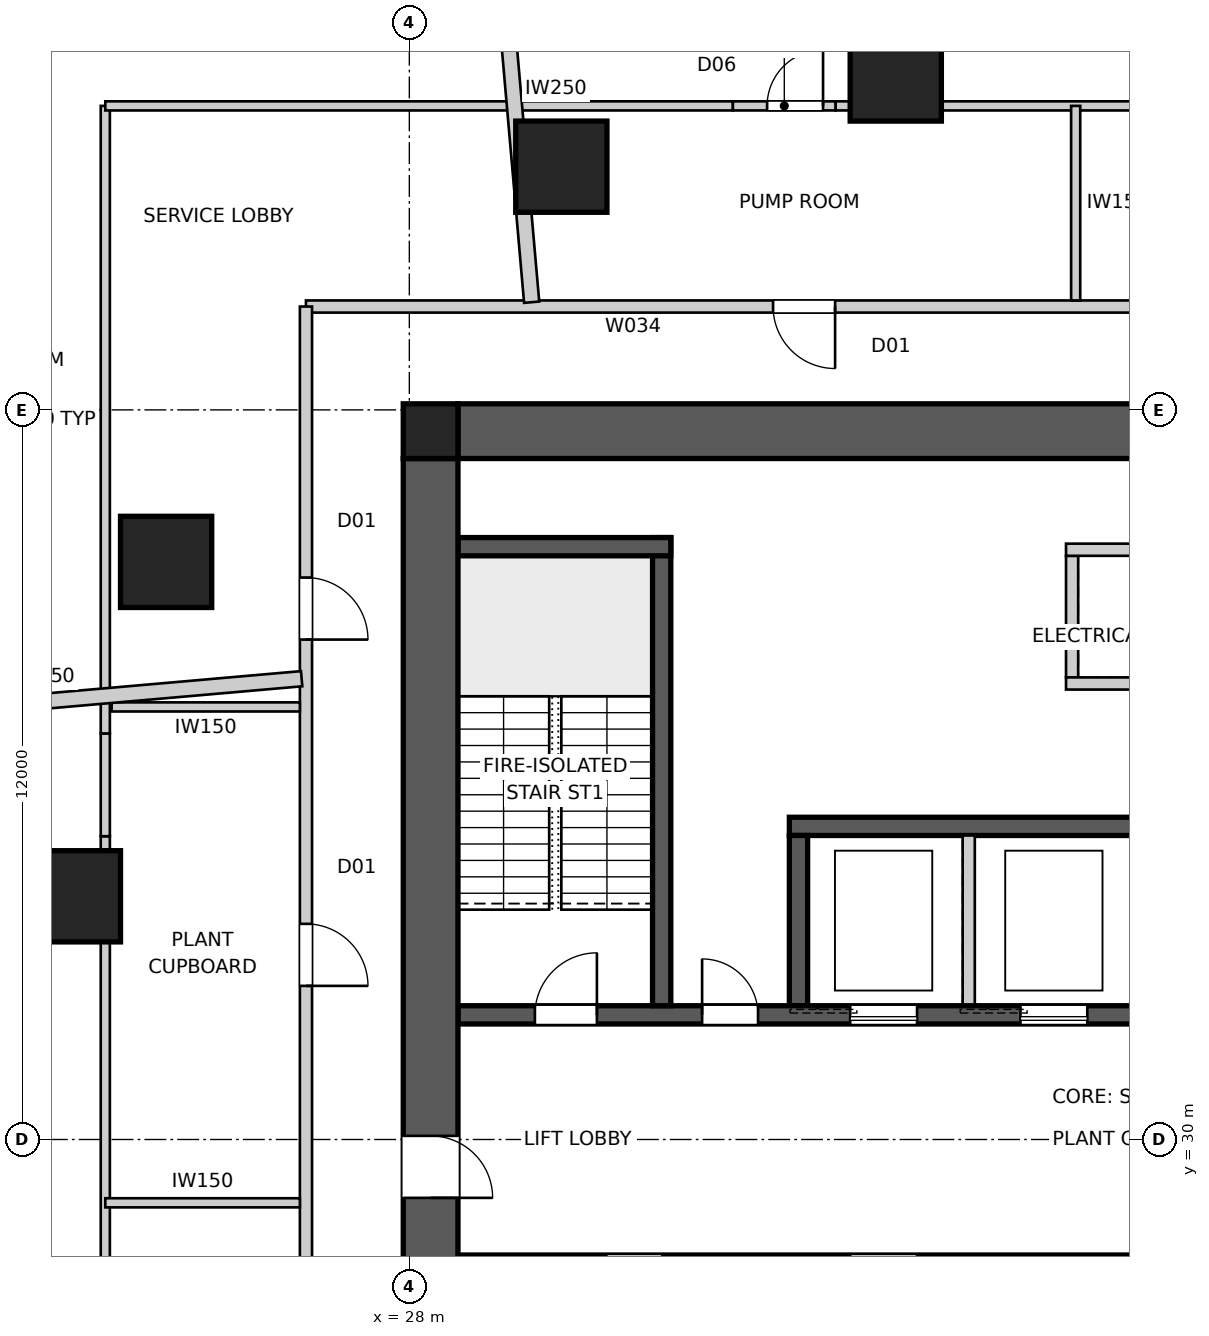
"""IFC4 building model, lengths in metres.
Left out: names, types, materials, properties, quantities, classifications, styles, units other than length and angle.
Written with IfcOpenShell. Run it as: python <this file> out.ifc"""

import sys

from ifc_helpers import new_model, si_unit, direction, frame, frame_2d, origin, origin_2d, place, context, subcontext, project, spatial, polyline, rectangle, outline, extrude, element, fill, save


model = new_model("IFC4")
c1 = context("Model", 3, precision=1e-05, world=origin(), true_north=direction((0.0, 1.0)))
c2 = subcontext(c1, "Body", "Model", "MODEL_VIEW")
j1 = project(units=[si_unit("LENGTHUNIT", "METRE"), si_unit("PLANEANGLEUNIT", "RADIAN")], contexts=[c1])
p1 = place(None, origin())
s1 = spatial("IfcSite", under=j1, at=p1, CompositionType="ELEMENT")
p2 = place(p1, origin())
s2 = spatial("IfcBuilding", under=s1, at=p2, CompositionType="ELEMENT")
p3 = place(p2, frame((0.0, 0.0, 42.2)))
s3 = spatial("IfcBuildingStorey", under=s2, at=p3, CompositionType="ELEMENT", Elevation=42.2)
p4 = place(p3, frame((28.8, 41.65, 0.0), z_axis=(0.0, 0.0, 1.0), x_axis=(1.0, 0.0, 0.0)))
e1 = element("IfcWall", 1, at=p4, inside=s3, PredefinedType="SHEAR", context=c2, shape_type="SweptSolid", body=[
    extrude(outline(polyline([(0.0, -0.45), (22.4, -0.45), (22.4, -0.025), (22.85, -0.025), (22.85, 0.025), (22.4, 0.025), (22.4, 0.45), (0.0, 0.45), (0.0, 0.025), (-0.45, 0.025), (-0.45, -0.025), (0.0, -0.025), (0.0, -0.45)])), origin(), (0.0, 0.0, 1.0), 5.0),
])
p5 = place(p3, frame((28.35, 41.2, 0.0), z_axis=(0.0, 0.0, 1.0), x_axis=(0.0, -1.0, 0.0)))
e2 = element("IfcWall", 2, at=p5, inside=s3, PredefinedType="SHEAR", context=c2, shape_type="SweptSolid", body=[
    extrude(outline(polyline([(0.0, -0.45), (22.4, -0.45), (22.4, -0.025), (22.85, -0.025), (22.85, 0.025), (22.4, 0.025), (22.4, 0.45), (0.0, 0.45), (0.0, 0.025), (-0.45, 0.025), (-0.45, -0.025), (0.0, -0.025), (0.0, -0.45)])), origin(), (0.0, 0.0, 1.0), 5.0),
])
p6 = place(p5, frame((11.14, 0.0, 0.0)))
e3 = element("IfcOpeningElement", 3, at=p6, cuts=e2, PredefinedType="OPENING", context=c2, shape_type="SweptSolid", body=[
    extrude(rectangle(XDim=1.02, YDim=2.4, at=frame_2d((0.51, 1.2))), frame((0.0, 0.46, 0.0), z_axis=(0.0, -1.0, 0.0), x_axis=(1.0, 0.0, 0.0)), (0.0, 0.0, 1.0), 0.92),
])
p7 = place(p3, frame((28.8, 32.05, 0.0), z_axis=(0.0, 0.0, 1.0), x_axis=(1.0, 0.0, 0.0)))
e4 = element("IfcWall", 4, at=p7, inside=s3, PredefinedType="SHEAR", context=c2, shape_type="SweptSolid", body=[
    extrude(rectangle(XDim=22.4, YDim=0.3, at=frame_2d((11.2, 0.0))), origin(), (0.0, 0.0, 1.0), 5.0),
])
p8 = place(p7, frame((19.04, 0.0, 0.0)))
e5 = element("IfcOpeningElement", 5, at=p8, cuts=e4, PredefinedType="OPENING", context=c2, shape_type="SweptSolid", body=[
    extrude(rectangle(XDim=0.92, YDim=2.1, at=frame_2d((0.46, 1.05))), frame((0.0, 0.16, 0.0), z_axis=(0.0, -1.0, 0.0), x_axis=(1.0, 0.0, 0.0)), (0.0, 0.0, 1.0), 0.32),
])
p9 = place(p7, frame((1.265, 0.0, 0.0)))
e6 = element("IfcOpeningElement", 6, at=p9, cuts=e4, PredefinedType="OPENING", context=c2, shape_type="SweptSolid", body=[
    extrude(rectangle(XDim=1.02, YDim=2.1, at=frame_2d((0.51, 1.05))), frame((0.0, 0.16, 0.0), z_axis=(0.0, -1.0, 0.0), x_axis=(1.0, 0.0, 0.0)), (0.0, 0.0, 1.0), 0.32),
])
p10 = place(p7, frame((4.015, 0.0, 0.0)))
e7 = element("IfcOpeningElement", 7, at=p10, cuts=e4, PredefinedType="OPENING", context=c2, shape_type="SweptSolid", body=[
    extrude(rectangle(XDim=0.92, YDim=2.1, at=frame_2d((0.46, 1.05))), frame((0.0, 0.16, 0.0), z_axis=(0.0, -1.0, 0.0), x_axis=(1.0, 0.0, 0.0)), (0.0, 0.0, 1.0), 0.32),
])
p11 = place(p7, frame((6.45, 0.0, 0.0)))
e8 = element("IfcOpeningElement", 8, at=p11, cuts=e4, PredefinedType="OPENING", context=c2, shape_type="SweptSolid", body=[
    extrude(rectangle(XDim=1.1, YDim=2.1, at=frame_2d((0.55, 1.05))), frame((0.0, 0.16, 0.0), z_axis=(0.0, -1.0, 0.0), x_axis=(1.0, 0.0, 0.0)), (0.0, 0.0, 1.0), 0.32),
])
p12 = place(p7, frame((9.25, 0.0, 0.0)))
e9 = element("IfcOpeningElement", 9, at=p12, cuts=e4, PredefinedType="OPENING", context=c2, shape_type="SweptSolid", body=[
    extrude(rectangle(XDim=1.1, YDim=2.1, at=frame_2d((0.55, 1.05))), frame((0.0, 0.16, 0.0), z_axis=(0.0, -1.0, 0.0), x_axis=(1.0, 0.0, 0.0)), (0.0, 0.0, 1.0), 0.32),
])
p13 = place(p7, frame((14.85, 0.0, 0.0)))
e10 = element("IfcOpeningElement", 10, at=p13, cuts=e4, PredefinedType="OPENING", context=c2, shape_type="SweptSolid", body=[
    extrude(rectangle(XDim=1.1, YDim=2.1, at=frame_2d((0.55, 1.05))), frame((0.0, 0.16, 0.0), z_axis=(0.0, -1.0, 0.0), x_axis=(1.0, 0.0, 0.0)), (0.0, 0.0, 1.0), 0.32),
])
p14 = place(p3, frame((51.2, 27.95, 0.0), z_axis=(0.0, 0.0, 1.0), x_axis=(-1.0, 0.0, 0.0)))
e11 = element("IfcWall", 11, at=p14, inside=s3, PredefinedType="SHEAR", context=c2, shape_type="SweptSolid", body=[
    extrude(rectangle(XDim=22.4, YDim=0.3, at=frame_2d((11.2, 0.0))), origin(), (0.0, 0.0, 1.0), 5.0),
])
p15 = place(p14, frame((19.04, 0.0, 0.0)))
e12 = element("IfcOpeningElement", 12, at=p15, cuts=e11, PredefinedType="OPENING", context=c2, shape_type="SweptSolid", body=[
    extrude(rectangle(XDim=0.92, YDim=2.1, at=frame_2d((0.46, 1.05))), frame((0.0, 0.16, 0.0), z_axis=(0.0, -1.0, 0.0), x_axis=(1.0, 0.0, 0.0)), (0.0, 0.0, 1.0), 0.32),
])
p16 = place(p14, frame((1.265, 0.0, 0.0)))
e13 = element("IfcOpeningElement", 13, at=p16, cuts=e11, PredefinedType="OPENING", context=c2, shape_type="SweptSolid", body=[
    extrude(rectangle(XDim=1.02, YDim=2.1, at=frame_2d((0.51, 1.05))), frame((0.0, 0.16, 0.0), z_axis=(0.0, -1.0, 0.0), x_axis=(1.0, 0.0, 0.0)), (0.0, 0.0, 1.0), 0.32),
])
p17 = place(p14, frame((4.015, 0.0, 0.0)))
e14 = element("IfcOpeningElement", 14, at=p17, cuts=e11, PredefinedType="OPENING", context=c2, shape_type="SweptSolid", body=[
    extrude(rectangle(XDim=0.92, YDim=2.1, at=frame_2d((0.46, 1.05))), frame((0.0, 0.16, 0.0), z_axis=(0.0, -1.0, 0.0), x_axis=(1.0, 0.0, 0.0)), (0.0, 0.0, 1.0), 0.32),
])
p18 = place(p14, frame((14.85, 0.0, 0.0)))
e15 = element("IfcOpeningElement", 15, at=p18, cuts=e11, PredefinedType="OPENING", context=c2, shape_type="SweptSolid", body=[
    extrude(rectangle(XDim=1.1, YDim=2.1, at=frame_2d((0.55, 1.05))), frame((0.0, 0.16, 0.0), z_axis=(0.0, -1.0, 0.0), x_axis=(1.0, 0.0, 0.0)), (0.0, 0.0, 1.0), 0.32),
])
p19 = place(p3, frame((34.25, 35.15, 0.0), z_axis=(0.0, 0.0, 1.0), x_axis=(1.0, 0.0, 0.0)))
e16 = element("IfcWall", 16, at=p19, inside=s3, PredefinedType="SHEAR", context=c2, shape_type="SweptSolid", body=[
    extrude(rectangle(XDim=11.5, YDim=0.3, at=frame_2d((5.75, 0.0))), origin(), (0.0, 0.0, 1.0), 5.0),
])
p20 = place(p3, frame((34.4, 32.2, 0.0), z_axis=(0.0, 0.0, 1.0), x_axis=(0.0, 1.0, 0.0)))
e17 = element("IfcWall", 17, at=p20, inside=s3, PredefinedType="SHEAR", context=c2, shape_type="SweptSolid", body=[
    extrude(rectangle(XDim=2.8, YDim=0.3, at=frame_2d((1.4, 0.0))), origin(), (0.0, 0.0, 1.0), 5.0),
])
p21 = place(p3, frame((37.2, 32.2, 0.0), z_axis=(0.0, 0.0, 1.0), x_axis=(0.0, 1.0, 0.0)))
e18 = element("IfcWall", 18, at=p21, inside=s3, PredefinedType="SOLIDWALL", context=c2, shape_type="SweptSolid", body=[
    extrude(rectangle(XDim=2.8, YDim=0.2, at=frame_2d((1.4, 0.0))), origin(), (0.0, 0.0, 1.0), 5.0),
])
p22 = place(p3, frame((32.15, 32.2, 0.0), z_axis=(0.0, 0.0, 1.0), x_axis=(0.0, 1.0, 0.0)))
e19 = element("IfcWall", 19, at=p22, inside=s3, PredefinedType="SHEAR", context=c2, shape_type="SweptSolid", body=[
    extrude(rectangle(XDim=7.7, YDim=0.3, at=frame_2d((3.85, 0.0))), origin(), (0.0, 0.0, 1.0), 5.0),
])
p23 = place(p3, frame((28.8, 39.75, 0.0), z_axis=(0.0, 0.0, 1.0), x_axis=(1.0, 0.0, 0.0)))
e20 = element("IfcWall", 20, at=p23, inside=s3, PredefinedType="SHEAR", context=c2, shape_type="SweptSolid", body=[
    extrude(rectangle(XDim=3.5, YDim=0.3, at=frame_2d((1.75, 0.0))), origin(), (0.0, 0.0, 1.0), 5.0),
])
p24 = place(p3, frame((38.9, 37.6, 0.0), z_axis=(0.0, 0.0, 1.0), x_axis=(0.0, 1.0, 0.0)))
e21 = element("IfcWall", 21, at=p24, inside=s3, PredefinedType="SOLIDWALL", context=c2, shape_type="SweptSolid", body=[
    extrude(rectangle(XDim=2.0, YDim=0.2, at=frame_2d((1.0, 0.0))), origin(), (0.0, 0.0, 1.0), 5.0),
])
for number, where, z_axis, x_axis in (
    (22, (38.8, 37.5, 0.0), (0.0, 0.0, 1.0), (1.0, 0.0, 0.0)),
    (23, (38.8, 39.7, 0.0), (0.0, 0.0, 1.0), (1.0, 0.0, 0.0)),
):
    element("IfcWall", number, at=place(p3, frame(where, z_axis=z_axis, x_axis=x_axis)), inside=s3, PredefinedType="SOLIDWALL", context=c2, shape_type="SweptSolid", body=[
        extrude(rectangle(XDim=2.4, YDim=0.2, at=frame_2d((1.2, 0.0))), origin(), (0.0, 0.0, 1.0), 5.0),
    ])
p25 = place(p3, frame((28.35, 41.65, 0.0), z_axis=(0.0, 0.0, 1.0), x_axis=(1.0, 0.0, 0.0)))
e24 = element("IfcColumn", 24, at=p25, inside=s3, PredefinedType="COLUMN", context=c2, shape_type="SweptSolid", body=[
    extrude(rectangle(XDim=0.9, YDim=0.9, at=origin_2d()), origin(), (0.0, 0.0, 1.0), 5.0),
])
for number, where, z_axis, x_axis in (
    (25, (36.0, 47.5, 0.0), (0.0, 0.0, 1.0), (1.0, 0.0, 0.0)),
    (26, (30.5, 46.0, 0.0), (0.0, 0.0, 1.0), (1.0, 0.0, 0.0)),
    (27, (24.0, 39.5, 0.0), (0.0, 0.0, 1.0), (1.0, 0.0, 0.0)),
    (28, (22.5, 34.0, 0.0), (0.0, 0.0, 1.0), (1.0, 0.0, 0.0)),
):
    element("IfcColumn", number, at=place(p3, frame(where, z_axis=z_axis, x_axis=x_axis)), inside=s3, PredefinedType="COLUMN", context=c2, shape_type="SweptSolid", body=[
        extrude(rectangle(XDim=1.5, YDim=1.5, at=origin_2d()), origin(), (0.0, 0.0, 1.0), 5.0),
    ])
p26 = place(p3, frame((53.7, 43.7, 0.0), z_axis=(0.0, 0.0, 1.0), x_axis=(-1.0, 0.0, 0.0)))
e29 = element("IfcWall", 29, at=p26, inside=s3, PredefinedType="PARTITIONING", context=c2, shape_type="SweptSolid", body=[
    extrude(rectangle(XDim=27.4, YDim=0.2, at=frame_2d((13.7, 0.0))), origin(), (0.0, 0.0, 1.0), 4.85),
])
p27 = place(p26, frame((18.698, 0.0, 0.0)))
e30 = element("IfcOpeningElement", 30, at=p27, cuts=e29, PredefinedType="OPENING", context=c2, shape_type="SweptSolid", body=[
    extrude(rectangle(XDim=1.02, YDim=2.34, at=frame_2d((0.51, 1.17))), frame((0.0, 0.11, 0.0), z_axis=(0.0, -1.0, 0.0), x_axis=(1.0, 0.0, 0.0)), (0.0, 0.0, 1.0), 0.22),
])
p28 = place(p26, frame((10.153, 0.0, 0.0)))
e31 = element("IfcOpeningElement", 31, at=p28, cuts=e29, PredefinedType="OPENING", context=c2, shape_type="SweptSolid", body=[
    extrude(rectangle(XDim=1.02, YDim=2.34, at=frame_2d((0.51, 1.17))), frame((0.0, 0.11, 0.0), z_axis=(0.0, -1.0, 0.0), x_axis=(1.0, 0.0, 0.0)), (0.0, 0.0, 1.0), 0.22),
])
p29 = place(p26, frame((4.458, 0.0, 0.0)))
e32 = element("IfcOpeningElement", 32, at=p29, cuts=e29, PredefinedType="OPENING", context=c2, shape_type="SweptSolid", body=[
    extrude(rectangle(XDim=1.02, YDim=2.34, at=frame_2d((0.51, 1.17))), frame((0.0, 0.11, 0.0), z_axis=(0.0, -1.0, 0.0), x_axis=(1.0, 0.0, 0.0)), (0.0, 0.0, 1.0), 0.22),
])
p30 = place(p3, frame((26.3, 43.7, 0.0), z_axis=(0.0, 0.0, 1.0), x_axis=(0.0, -1.0, 0.0)))
e33 = element("IfcWall", 33, at=p30, inside=s3, PredefinedType="PARTITIONING", context=c2, shape_type="SweptSolid", body=[
    extrude(rectangle(XDim=27.4, YDim=0.2, at=frame_2d((13.7, 0.0))), origin(), (0.0, 0.0, 1.0), 4.85),
])
p31 = place(p30, frame((18.698, 0.0, 0.0)))
e34 = element("IfcOpeningElement", 34, at=p31, cuts=e33, PredefinedType="OPENING", context=c2, shape_type="SweptSolid", body=[
    extrude(rectangle(XDim=1.02, YDim=2.34, at=frame_2d((0.51, 1.17))), frame((0.0, 0.11, 0.0), z_axis=(0.0, -1.0, 0.0), x_axis=(1.0, 0.0, 0.0)), (0.0, 0.0, 1.0), 0.22),
])
p32 = place(p30, frame((10.153, 0.0, 0.0)))
e35 = element("IfcOpeningElement", 35, at=p32, cuts=e33, PredefinedType="OPENING", context=c2, shape_type="SweptSolid", body=[
    extrude(rectangle(XDim=1.02, YDim=2.34, at=frame_2d((0.51, 1.17))), frame((0.0, 0.11, 0.0), z_axis=(0.0, -1.0, 0.0), x_axis=(1.0, 0.0, 0.0)), (0.0, 0.0, 1.0), 0.22),
])
p33 = place(p30, frame((4.458, 0.0, 0.0)))
e36 = element("IfcOpeningElement", 36, at=p33, cuts=e33, PredefinedType="OPENING", context=c2, shape_type="SweptSolid", body=[
    extrude(rectangle(XDim=1.02, YDim=2.34, at=frame_2d((0.51, 1.17))), frame((0.0, 0.11, 0.0), z_axis=(0.0, -1.0, 0.0), x_axis=(1.0, 0.0, 0.0)), (0.0, 0.0, 1.0), 0.22),
])
p34 = place(p3, frame((29.409, 50.656, 0.0), z_axis=(0.0, 0.0, 1.0), x_axis=(0.087152488477, -0.996194982798, 0.0)))
e37 = element("IfcWall", 37, at=p34, inside=s3, PredefinedType="PARTITIONING", context=c2, shape_type="SweptSolid", body=[
    extrude(rectangle(XDim=6.911, YDim=0.25, at=frame_2d((3.456, 0.0))), origin(), (0.0, 0.0, 1.0), 4.85),
])
p35 = place(p3, frame((17.819, 36.843, 0.0), z_axis=(0.0, 0.0, 1.0), x_axis=(0.996194000005, 0.087163721544, 0.0)))
e38 = element("IfcWall", 38, at=p35, inside=s3, PredefinedType="PARTITIONING", context=c2, shape_type="SweptSolid", body=[
    extrude(rectangle(XDim=8.442, YDim=0.25, at=frame_2d((4.221, 0.0))), origin(), (0.0, 0.0, 1.0), 4.85),
])
p36 = place(p3, frame((23.0, 25.012, 0.0), z_axis=(0.0, 0.0, 1.0), x_axis=(0.0, 1.0, 0.0)))
e39 = element("IfcWall", 39, at=p36, inside=s3, PredefinedType="SOLIDWALL", context=c2, shape_type="SweptSolid", body=[
    extrude(rectangle(XDim=9.977, YDim=0.15, at=frame_2d((4.988, 0.0))), origin(), (0.0, 0.0, 1.0), 4.85),
])
p37 = place(p3, frame((23.0, 34.988, 0.0), z_axis=(0.0, 0.0, 1.0), x_axis=(0.0, 1.0, 0.0)))
e40 = element("IfcWall", 40, at=p37, inside=s3, PredefinedType="SOLIDWALL", context=c2, shape_type="SweptSolid", body=[
    extrude(rectangle(XDim=1.69, YDim=0.15, at=frame_2d((0.845, 0.0))), origin(), (0.0, 0.0, 1.0), 3.85),
])
for number, where, z_axis, x_axis in (
    (41, (23.0, 36.678, 0.0), (0.0, 0.0, 1.0), (0.0, 1.0, 0.0)),
    (42, (23.0, 47.0, 0.0), (0.0, 0.0, 1.0), (1.0, 0.0, 0.0)),
):
    element("IfcWall", number, at=place(p3, frame(where, z_axis=z_axis, x_axis=x_axis)), inside=s3, PredefinedType="SOLIDWALL", context=c2, shape_type="SweptSolid", body=[
        extrude(rectangle(XDim=10.322, YDim=0.15, at=frame_2d((5.161, 0.0))), origin(), (0.0, 0.0, 1.0), 4.85),
    ])
p38 = place(p3, frame((33.322, 47.0, 0.0), z_axis=(0.0, 0.0, 1.0), x_axis=(1.0, 0.0, 0.0)))
e43 = element("IfcWall", 43, at=p38, inside=s3, PredefinedType="SOLIDWALL", context=c2, shape_type="SweptSolid", body=[
    extrude(rectangle(XDim=1.69, YDim=0.15, at=frame_2d((0.845, 0.0))), origin(), (0.0, 0.0, 1.0), 3.85),
])
p39 = place(p38, frame((0.562, 0.0, 0.0)))
e44 = element("IfcOpeningElement", 44, at=p39, cuts=e43, PredefinedType="OPENING", context=c2, shape_type="SweptSolid", body=[
    extrude(rectangle(XDim=0.92, YDim=2.1, at=frame_2d((0.46, 1.05))), frame((0.0, 0.085, 0.0), z_axis=(0.0, -1.0, 0.0), x_axis=(1.0, 0.0, 0.0)), (0.0, 0.0, 1.0), 0.17),
])
p40 = place(p3, frame((35.012, 47.0, 0.0), z_axis=(0.0, 0.0, 1.0), x_axis=(1.0, 0.0, 0.0)))
e45 = element("IfcWall", 45, at=p40, inside=s3, PredefinedType="SOLIDWALL", context=c2, shape_type="SweptSolid", body=[
    extrude(rectangle(XDim=9.977, YDim=0.15, at=frame_2d((4.988, 0.0))), origin(), (0.0, 0.0, 1.0), 4.85),
])
p41 = place(p3, frame((38.959, 47.0, 0.0), z_axis=(0.0, 0.0, 1.0), x_axis=(0.0, -1.0, 0.0)))
e46 = element("IfcWall", 46, at=p41, inside=s3, PredefinedType="SOLIDWALL", context=c2, shape_type="SweptSolid", body=[
    extrude(rectangle(XDim=3.2, YDim=0.15, at=frame_2d((1.6, 0.0))), origin(), (0.0, 0.0, 1.0), 4.85),
])
p42 = place(p3, frame((26.2, 37.115, 0.0), z_axis=(0.0, 0.0, 1.0), x_axis=(-1.0, 0.0, 0.0)))
e47 = element("IfcWall", 47, at=p42, inside=s3, PredefinedType="SOLIDWALL", context=c2, shape_type="SweptSolid", body=[
    extrude(rectangle(XDim=3.096, YDim=0.15, at=frame_2d((1.548, 0.0))), origin(), (0.0, 0.0, 1.0), 4.85),
])
p43 = place(p3, frame((23.0, 28.959, 0.0), z_axis=(0.0, 0.0, 1.0), x_axis=(1.0, 0.0, 0.0)))
e48 = element("IfcWall", 48, at=p43, inside=s3, PredefinedType="SOLIDWALL", context=c2, shape_type="SweptSolid", body=[
    extrude(rectangle(XDim=3.2, YDim=0.15, at=frame_2d((1.6, 0.0))), origin(), (0.0, 0.0, 1.0), 4.85),
])
p44 = place(p9, origin())
e49 = element("IfcDoor", 49, at=p44, inside=s3, OperationType="SINGLE_SWING_RIGHT", PredefinedType="DOOR", context=c2, shape_type="SweptSolid", body=[
    extrude(rectangle(XDim=1.02, YDim=2.1, at=frame_2d((0.51, 1.05))), frame((0.0, 0.025, 0.0), z_axis=(0.0, -1.0, 0.0), x_axis=(1.0, 0.0, 0.0)), (0.0, 0.0, 1.0), 0.05),
])
fill(e6, e49)
p45 = place(p10, origin())
e50 = element("IfcDoor", 50, at=p45, inside=s3, OperationType="SINGLE_SWING_LEFT", PredefinedType="DOOR", context=c2, shape_type="SweptSolid", body=[
    extrude(rectangle(XDim=0.92, YDim=2.1, at=frame_2d((0.46, 1.05))), frame((0.0, 0.025, 0.0), z_axis=(0.0, -1.0, 0.0), x_axis=(1.0, 0.0, 0.0)), (0.0, 0.0, 1.0), 0.05),
])
fill(e7, e50)
p46 = place(p27, origin())
e51 = element("IfcDoor", 51, at=p46, inside=s3, OperationType="SINGLE_SWING_LEFT", PredefinedType="DOOR", context=c2, shape_type="SweptSolid", body=[
    extrude(rectangle(XDim=1.02, YDim=2.34, at=frame_2d((0.51, 1.17))), frame((0.0, 0.025, 0.0), z_axis=(0.0, -1.0, 0.0), x_axis=(1.0, 0.0, 0.0)), (0.0, 0.0, 1.0), 0.05),
])
fill(e30, e51)
p47 = place(p32, origin())
e52 = element("IfcDoor", 52, at=p47, inside=s3, OperationType="SINGLE_SWING_RIGHT", PredefinedType="DOOR", context=c2, shape_type="SweptSolid", body=[
    extrude(rectangle(XDim=1.02, YDim=2.34, at=frame_2d((0.51, 1.17))), frame((0.0, 0.025, 0.0), z_axis=(0.0, -1.0, 0.0), x_axis=(1.0, 0.0, 0.0)), (0.0, 0.0, 1.0), 0.05),
])
fill(e35, e52)
p48 = place(p33, origin())
e53 = element("IfcDoor", 53, at=p48, inside=s3, OperationType="SINGLE_SWING_RIGHT", PredefinedType="DOOR", context=c2, shape_type="SweptSolid", body=[
    extrude(rectangle(XDim=1.02, YDim=2.34, at=frame_2d((0.51, 1.17))), frame((0.0, 0.025, 0.0), z_axis=(0.0, -1.0, 0.0), x_axis=(1.0, 0.0, 0.0)), (0.0, 0.0, 1.0), 0.05),
])
fill(e36, e53)
p49 = place(p39, origin())
e54 = element("IfcDoor", 54, at=p49, inside=s3, OperationType="SINGLE_SWING_RIGHT", PredefinedType="DOOR", context=c2, shape_type="SweptSolid", body=[
    extrude(rectangle(XDim=0.92, YDim=2.1, at=frame_2d((0.46, 1.05))), frame((0.0, 0.025, 0.0), z_axis=(0.0, -1.0, 0.0), x_axis=(1.0, 0.0, 0.0)), (0.0, 0.0, 1.0), 0.05),
])
fill(e44, e54)
p50 = place(p6, origin())
e55 = element("IfcDoor", 55, at=p50, inside=s3, OperationType="SINGLE_SWING_RIGHT", PredefinedType="DOOR", context=c2, shape_type="SweptSolid", body=[
    extrude(rectangle(XDim=1.02, YDim=2.4, at=frame_2d((0.51, 1.2))), frame((0.0, 0.025, 0.0), z_axis=(0.0, -1.0, 0.0), x_axis=(1.0, 0.0, 0.0)), (0.0, 0.0, 1.0), 0.05),
])
fill(e3, e55)
p51 = place(p11, origin())
e56 = element("IfcDoor", 56, at=p51, inside=s3, OperationType="SLIDING_TO_LEFT", PredefinedType="DOOR", context=c2, shape_type="SweptSolid", body=[
    extrude(rectangle(XDim=1.1, YDim=2.1, at=frame_2d((0.55, 1.05))), frame((0.0, 0.025, 0.0), z_axis=(0.0, -1.0, 0.0), x_axis=(1.0, 0.0, 0.0)), (0.0, 0.0, 1.0), 0.05),
])
fill(e8, e56)
p52 = place(p12, origin())
e57 = element("IfcDoor", 57, at=p52, inside=s3, OperationType="SLIDING_TO_LEFT", PredefinedType="DOOR", context=c2, shape_type="SweptSolid", body=[
    extrude(rectangle(XDim=1.1, YDim=2.1, at=frame_2d((0.55, 1.05))), frame((0.0, 0.025, 0.0), z_axis=(0.0, -1.0, 0.0), x_axis=(1.0, 0.0, 0.0)), (0.0, 0.0, 1.0), 0.05),
])
fill(e9, e57)
save(model, sys.argv[1])
